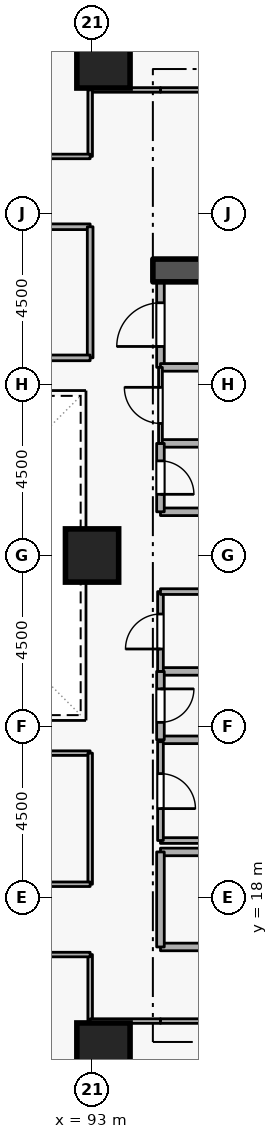
"""IFC4 building model, lengths in metres.
Left out: names, types, materials, properties, quantities, classifications, styles, units other than length and angle.
Written with IfcOpenShell. Run it as: python <this file> out.ifc"""

import sys

from ifc_helpers import new_model, si_unit, direction, frame, frame_2d, origin, origin_2d, place, context, subcontext, project, spatial, rectangle, extrude, element, fill, save


model = new_model("IFC4")
c1 = context("Model", 3, precision=1e-05, world=origin(), true_north=direction((0.0, 1.0)))
c2 = subcontext(c1, "Body", "Model", "MODEL_VIEW")
j1 = project(units=[si_unit("LENGTHUNIT", "METRE"), si_unit("PLANEANGLEUNIT", "RADIAN")], contexts=[c1])
p1 = place(None, origin())
s1 = spatial("IfcSite", under=j1, at=p1, CompositionType="ELEMENT")
p2 = place(p1, origin())
s2 = spatial("IfcBuilding", under=s1, at=p2, CompositionType="ELEMENT")
p3 = place(p2, frame((0.0, 0.0, 60.9)))
s3 = spatial("IfcBuildingStorey", under=s2, at=p3, CompositionType="ELEMENT", Elevation=60.9)
p4 = place(p3, frame((94.6, 34.5, 0.0), z_axis=(0.0, 0.0, 1.0), x_axis=(1.0, 0.0, 0.0)))
e1 = element("IfcWall", 1, at=p4, inside=s3, PredefinedType="SHEAR", context=c2, shape_type="SweptSolid", body=[
    extrude(rectangle(XDim=5.7, YDim=0.6, at=frame_2d((2.85, 0.0))), origin(), (0.0, 0.0, 1.0), 3.6),
])
for number, where, z_axis, x_axis in (
    (2, (93.3, 14.0, 0.0), (0.0, 0.0, 1.0), (1.0, 0.0, 0.0)),
    (3, (93.3, 40.0, 0.0), (0.0, 0.0, 1.0), (1.0, 0.0, 0.0)),
    (4, (93.0, 27.0, 0.0), (0.0, 0.0, 1.0), (1.0, 0.0, 0.0)),
):
    element("IfcColumn", number, at=place(p3, frame(where, z_axis=z_axis, x_axis=x_axis)), inside=s3, PredefinedType="COLUMN", context=c2, shape_type="SweptSolid", body=[
        extrude(rectangle(XDim=1.4, YDim=1.4, at=origin_2d()), origin(), (0.0, 0.0, 1.0), 3.6),
    ])
p5 = place(p3, frame((94.8, 16.7, 0.0), z_axis=(0.0, 0.0, 1.0), x_axis=(1.0, 0.0, 0.0)))
e5 = element("IfcWall", 5, at=p5, inside=s3, PredefinedType="STANDARD", context=c2, shape_type="SweptSolid", body=[
    extrude(rectangle(XDim=5.7, YDim=0.2, at=frame_2d((2.85, 0.0))), origin(), (0.0, 0.0, 1.0), 3.34),
])
p6 = place(p5, frame((2.275, 0.0, 0.0)))
e6 = element("IfcOpeningElement", 6, at=p6, cuts=e5, PredefinedType="OPENING", context=c2, shape_type="SweptSolid", body=[
    extrude(rectangle(XDim=1.15, YDim=2.1, at=frame_2d((0.575, 1.05))), frame((0.0, 0.11, 0.0), z_axis=(0.0, -1.0, 0.0), x_axis=(1.0, 0.0, 0.0)), (0.0, 0.0, 1.0), 0.22),
])
p7 = place(p3, frame((97.1, 19.2, 0.0), z_axis=(0.0, 0.0, 1.0), x_axis=(-1.0, 0.0, 0.0)))
e7 = element("IfcWall", 7, at=p7, inside=s3, PredefinedType="STANDARD", context=c2, shape_type="SweptSolid", body=[
    extrude(rectangle(XDim=2.3, YDim=0.2, at=frame_2d((1.15, 0.0))), origin(), (0.0, 0.0, 1.0), 2.545),
])
p8 = place(p3, frame((94.8, 19.2, 0.0), z_axis=(0.0, 0.0, 1.0), x_axis=(0.0, -1.0, 0.0)))
e8 = element("IfcWall", 8, at=p8, inside=s3, PredefinedType="STANDARD", context=c2, shape_type="SweptSolid", body=[
    extrude(rectangle(XDim=2.5, YDim=0.2, at=frame_2d((1.25, 0.0))), origin(), (0.0, 0.0, 1.0), 3.34),
])
for number, where, z_axis, x_axis in (
    (9, (94.8, 28.15, 0.0), (0.0, 0.0, 1.0), (1.0, 0.0, 0.0)),
    (10, (96.85, 29.95, 0.0), (0.0, 0.0, 1.0), (-1.0, 0.0, 0.0)),
):
    element("IfcWall", number, at=place(p3, frame(where, z_axis=z_axis, x_axis=x_axis)), inside=s3, PredefinedType="STANDARD", context=c2, shape_type="SweptSolid", body=[
        extrude(rectangle(XDim=2.05, YDim=0.2, at=frame_2d((1.025, 0.0))), origin(), (0.0, 0.0, 1.0), 3.34),
    ])
p9 = place(p3, frame((94.8, 29.95, 0.0), z_axis=(0.0, 0.0, 1.0), x_axis=(0.0, -1.0, 0.0)))
e11 = element("IfcWall", 11, at=p9, inside=s3, PredefinedType="STANDARD", context=c2, shape_type="SweptSolid", body=[
    extrude(rectangle(XDim=1.8, YDim=0.2, at=frame_2d((0.9, 0.0))), origin(), (0.0, 0.0, 1.0), 3.34),
])
p10 = place(p9, frame((0.46, 0.0, 0.0)))
e12 = element("IfcOpeningElement", 12, at=p10, cuts=e11, PredefinedType="OPENING", context=c2, shape_type="SweptSolid", body=[
    extrude(rectangle(XDim=0.88, YDim=2.04, at=frame_2d((0.44, 1.02))), frame((0.0, 0.11, 0.0), z_axis=(0.0, -1.0, 0.0), x_axis=(1.0, 0.0, 0.0)), (0.0, 0.0, 1.0), 0.22),
])
for number, where, z_axis, x_axis in (
    (13, (94.8, 22.15, 0.0), (0.0, 0.0, 1.0), (1.0, 0.0, 0.0)),
    (14, (96.85, 23.95, 0.0), (0.0, 0.0, 1.0), (-1.0, 0.0, 0.0)),
):
    element("IfcWall", number, at=place(p3, frame(where, z_axis=z_axis, x_axis=x_axis)), inside=s3, PredefinedType="STANDARD", context=c2, shape_type="SweptSolid", body=[
        extrude(rectangle(XDim=2.05, YDim=0.2, at=frame_2d((1.025, 0.0))), origin(), (0.0, 0.0, 1.0), 3.34),
    ])
p11 = place(p3, frame((94.8, 23.95, 0.0), z_axis=(0.0, 0.0, 1.0), x_axis=(0.0, -1.0, 0.0)))
e15 = element("IfcWall", 15, at=p11, inside=s3, PredefinedType="STANDARD", context=c2, shape_type="SweptSolid", body=[
    extrude(rectangle(XDim=1.8, YDim=0.2, at=frame_2d((0.9, 0.0))), origin(), (0.0, 0.0, 1.0), 3.34),
])
p12 = place(p11, frame((0.46, 0.0, 0.0)))
e16 = element("IfcOpeningElement", 16, at=p12, cuts=e15, PredefinedType="OPENING", context=c2, shape_type="SweptSolid", body=[
    extrude(rectangle(XDim=0.88, YDim=2.04, at=frame_2d((0.44, 1.02))), frame((0.0, 0.11, 0.0), z_axis=(0.0, -1.0, 0.0), x_axis=(1.0, 0.0, 0.0)), (0.0, 0.0, 1.0), 0.22),
])
p13 = place(p3, frame((94.8, 31.95, 0.0), z_axis=(0.0, 0.0, 1.0), x_axis=(0.0, 1.0, 0.0)))
e17 = element("IfcWall", 17, at=p13, inside=s3, PredefinedType="STANDARD", context=c2, shape_type="SweptSolid", body=[
    extrude(rectangle(XDim=2.25, YDim=0.2, at=frame_2d((1.125, 0.0))), origin(), (0.0, 0.0, 1.0), 3.34),
])
p14 = place(p13, frame((0.55, 0.0, 0.0)))
e18 = element("IfcOpeningElement", 18, at=p14, cuts=e17, PredefinedType="OPENING", context=c2, shape_type="SweptSolid", body=[
    extrude(rectangle(XDim=1.15, YDim=2.1, at=frame_2d((0.575, 1.05))), frame((0.0, 0.11, 0.0), z_axis=(0.0, -1.0, 0.0), x_axis=(1.0, 0.0, 0.0)), (0.0, 0.0, 1.0), 0.22),
])
p15 = place(p3, frame((96.85, 31.95, 0.0), z_axis=(0.0, 0.0, 1.0), x_axis=(-1.0, 0.0, 0.0)))
e19 = element("IfcWall", 19, at=p15, inside=s3, PredefinedType="STANDARD", context=c2, shape_type="SweptSolid", body=[
    extrude(rectangle(XDim=2.05, YDim=0.2, at=frame_2d((1.025, 0.0))), origin(), (0.0, 0.0, 1.0), 3.34),
])
p16 = place(p3, frame((94.8, 19.5, 0.0), z_axis=(0.0, 0.0, 1.0), x_axis=(1.0, 0.0, 0.0)))
e20 = element("IfcWall", 20, at=p16, inside=s3, PredefinedType="PARTITIONING", context=c2, shape_type="SweptSolid", body=[
    extrude(rectangle(XDim=2.05, YDim=0.15, at=frame_2d((1.025, 0.0))), origin(), (0.0, 0.0, 1.0), 2.545),
])
p17 = place(p3, frame((94.8, 22.1, 0.0), z_axis=(0.0, 0.0, 1.0), x_axis=(0.0, -1.0, 0.0)))
e21 = element("IfcWall", 21, at=p17, inside=s3, PredefinedType="PARTITIONING", context=c2, shape_type="SweptSolid", body=[
    extrude(rectangle(XDim=2.6, YDim=0.15, at=frame_2d((1.3, 0.0))), origin(), (0.0, 0.0, 1.0), 3.34),
])
p18 = place(p17, frame((0.84, 0.0, 0.0)))
e22 = element("IfcOpeningElement", 22, at=p18, cuts=e21, PredefinedType="OPENING", context=c2, shape_type="SweptSolid", body=[
    extrude(rectangle(XDim=0.92, YDim=2.08, at=frame_2d((0.46, 1.04))), frame((0.0, 0.085, 0.0), z_axis=(0.0, -1.0, 0.0), x_axis=(1.0, 0.0, 0.0)), (0.0, 0.0, 1.0), 0.17),
])
p19 = place(p3, frame((94.8, 23.95, 0.0), z_axis=(0.0, 0.0, 1.0), x_axis=(0.0, 1.0, 0.0)))
e23 = element("IfcWall", 23, at=p19, inside=s3, PredefinedType="PARTITIONING", context=c2, shape_type="SweptSolid", body=[
    extrude(rectangle(XDim=2.1, YDim=0.15, at=frame_2d((1.05, 0.0))), origin(), (0.0, 0.0, 1.0), 3.34),
])
p20 = place(p19, frame((0.59, 0.0, 0.0)))
e24 = element("IfcOpeningElement", 24, at=p20, cuts=e23, PredefinedType="OPENING", context=c2, shape_type="SweptSolid", body=[
    extrude(rectangle(XDim=0.92, YDim=2.08, at=frame_2d((0.46, 1.04))), frame((0.0, 0.085, 0.0), z_axis=(0.0, -1.0, 0.0), x_axis=(1.0, 0.0, 0.0)), (0.0, 0.0, 1.0), 0.17),
])
p21 = place(p3, frame((94.8, 26.05, 0.0), z_axis=(0.0, 0.0, 1.0), x_axis=(1.0, 0.0, 0.0)))
e25 = element("IfcWall", 25, at=p21, inside=s3, PredefinedType="PARTITIONING", context=c2, shape_type="SweptSolid", body=[
    extrude(rectangle(XDim=2.05, YDim=0.15, at=frame_2d((1.025, 0.0))), origin(), (0.0, 0.0, 1.0), 3.34),
])
p22 = place(p3, frame((94.8, 29.95, 0.0), z_axis=(0.0, 0.0, 1.0), x_axis=(0.0, 1.0, 0.0)))
e26 = element("IfcWall", 26, at=p22, inside=s3, PredefinedType="PARTITIONING", context=c2, shape_type="SweptSolid", body=[
    extrude(rectangle(XDim=2.0, YDim=0.1, at=frame_2d((1.0, 0.0))), origin(), (0.0, 0.0, 1.0), 3.34),
])
p23 = place(p22, frame((0.525, 0.0, 0.0)))
e27 = element("IfcOpeningElement", 27, at=p23, cuts=e26, PredefinedType="OPENING", context=c2, shape_type="SweptSolid", body=[
    extrude(rectangle(XDim=0.95, YDim=2.1, at=frame_2d((0.475, 1.05))), frame((0.0, 0.06, 0.0), z_axis=(0.0, -1.0, 0.0), x_axis=(1.0, 0.0, 0.0)), (0.0, 0.0, 1.0), 0.12),
])
p24 = place(p3, frame((92.95, 16.5, 0.0), z_axis=(0.0, 0.0, 1.0), x_axis=(0.0, -1.0, 0.0)))
e28 = element("IfcWall", 28, at=p24, inside=s3, PredefinedType="PARTITIONING", context=c2, shape_type="SweptSolid", body=[
    extrude(rectangle(XDim=1.75, YDim=0.12, at=frame_2d((0.875, 0.0))), origin(), (0.0, 0.0, 1.0), 3.34),
])
p25 = place(p3, frame((92.95, 14.75, 0.0), z_axis=(0.0, 0.0, 1.0), x_axis=(1.0, 0.0, 0.0)))
e29 = element("IfcWall", 29, at=p25, inside=s3, PredefinedType="PARTITIONING", context=c2, shape_type="SweptSolid", body=[
    extrude(rectangle(XDim=1.85, YDim=0.12, at=frame_2d((0.925, 0.0))), origin(), (0.0, 0.0, 1.0), 3.34),
])
p26 = place(p3, frame((94.8, 14.75, 0.0), z_axis=(0.0, 0.0, 1.0), x_axis=(1.0, 0.0, 0.0)))
e30 = element("IfcWall", 30, at=p26, inside=s3, PredefinedType="PARTITIONING", context=c2, shape_type="SweptSolid", body=[
    extrude(rectangle(XDim=9.35, YDim=0.12, at=frame_2d((4.675, 0.0))), origin(), (0.0, 0.0, 1.0), 3.34),
])
p27 = place(p26, frame((4.15, 0.0, 0.0)))
e31 = element("IfcOpeningElement", 31, at=p27, cuts=e30, PredefinedType="OPENING", context=c2, shape_type="SweptSolid", body=[
    extrude(rectangle(XDim=1.05, YDim=2.1, at=frame_2d((0.525, 1.05))), frame((0.0, 0.07, 0.0), z_axis=(0.0, -1.0, 0.0), x_axis=(1.0, 0.0, 0.0)), (0.0, 0.0, 1.0), 0.14),
])
p28 = place(p3, frame((88.5, 16.5, 0.0), z_axis=(0.0, 0.0, 1.0), x_axis=(1.0, 0.0, 0.0)))
e32 = element("IfcWall", 32, at=p28, inside=s3, PredefinedType="PARTITIONING", context=c2, shape_type="SweptSolid", body=[
    extrude(rectangle(XDim=4.45, YDim=0.12, at=frame_2d((2.225, 0.0))), origin(), (0.0, 0.0, 1.0), 3.34),
])
p29 = place(p3, frame((97.95, 39.25, 0.0), z_axis=(0.0, 0.0, 1.0), x_axis=(-1.0, 0.0, 0.0)))
e33 = element("IfcWall", 33, at=p29, inside=s3, PredefinedType="PARTITIONING", context=c2, shape_type="SweptSolid", body=[
    extrude(rectangle(XDim=3.15, YDim=0.12, at=frame_2d((1.575, 0.0))), origin(), (0.0, 0.0, 1.0), 3.34),
])
p30 = place(p3, frame((94.8, 39.25, 0.0), z_axis=(0.0, 0.0, 1.0), x_axis=(-1.0, 0.0, 0.0)))
e34 = element("IfcWall", 34, at=p30, inside=s3, PredefinedType="PARTITIONING", context=c2, shape_type="SweptSolid", body=[
    extrude(rectangle(XDim=1.85, YDim=0.12, at=frame_2d((0.925, 0.0))), origin(), (0.0, 0.0, 1.0), 3.34),
])
p31 = place(p3, frame((92.95, 39.25, 0.0), z_axis=(0.0, 0.0, 1.0), x_axis=(0.0, -1.0, 0.0)))
e35 = element("IfcWall", 35, at=p31, inside=s3, PredefinedType="PARTITIONING", context=c2, shape_type="SweptSolid", body=[
    extrude(rectangle(XDim=1.75, YDim=0.12, at=frame_2d((0.875, 0.0))), origin(), (0.0, 0.0, 1.0), 3.34),
])
p32 = place(p3, frame((92.95, 37.5, 0.0), z_axis=(0.0, 0.0, 1.0), x_axis=(-1.0, 0.0, 0.0)))
e36 = element("IfcWall", 36, at=p32, inside=s3, PredefinedType="PARTITIONING", context=c2, shape_type="SweptSolid", body=[
    extrude(rectangle(XDim=4.45, YDim=0.12, at=frame_2d((2.225, 0.0))), origin(), (0.0, 0.0, 1.0), 3.34),
])
p33 = place(p32, frame((1.7, 0.0, 0.0)))
e37 = element("IfcOpeningElement", 37, at=p33, cuts=e36, PredefinedType="OPENING", context=c2, shape_type="SweptSolid", body=[
    extrude(rectangle(XDim=1.05, YDim=2.1, at=frame_2d((0.525, 1.05))), frame((0.0, 0.07, 0.0), z_axis=(0.0, -1.0, 0.0), x_axis=(1.0, 0.0, 0.0)), (0.0, 0.0, 1.0), 0.14),
])
p34 = place(p3, frame((84.05, 35.65, 0.0), z_axis=(0.0, 0.0, 1.0), x_axis=(1.0, 0.0, 0.0)))
e38 = element("IfcWall", 38, at=p34, inside=s3, PredefinedType="PARTITIONING", context=c2, shape_type="SweptSolid", body=[
    extrude(rectangle(XDim=8.9, YDim=0.15, at=frame_2d((4.45, 0.0))), origin(), (0.0, 0.0, 1.0), 3.34),
])
p35 = place(p34, frame((3.8, 0.0, 0.0)))
e39 = element("IfcOpeningElement", 39, at=p35, cuts=e38, PredefinedType="OPENING", context=c2, shape_type="SweptSolid", body=[
    extrude(rectangle(XDim=1.3, YDim=2.12, at=frame_2d((0.65, 1.06))), frame((0.0, 0.085, 0.0), z_axis=(0.0, -1.0, 0.0), x_axis=(1.0, 0.0, 0.0)), (0.0, 0.0, 1.0), 0.17),
])
p36 = place(p3, frame((92.95, 35.65, 0.0), z_axis=(0.0, 0.0, 1.0), x_axis=(0.0, -1.0, 0.0)))
e40 = element("IfcWall", 40, at=p36, inside=s3, PredefinedType="PARTITIONING", context=c2, shape_type="SweptSolid", body=[
    extrude(rectangle(XDim=3.45, YDim=0.15, at=frame_2d((1.725, 0.0))), origin(), (0.0, 0.0, 1.0), 3.34),
])
p37 = place(p3, frame((92.95, 32.2, 0.0), z_axis=(0.0, 0.0, 1.0), x_axis=(-1.0, 0.0, 0.0)))
e41 = element("IfcWall", 41, at=p37, inside=s3, PredefinedType="PARTITIONING", context=c2, shape_type="SweptSolid", body=[
    extrude(rectangle(XDim=8.9, YDim=0.15, at=frame_2d((4.45, 0.0))), origin(), (0.0, 0.0, 1.0), 3.34),
])
p38 = place(p3, frame((84.05, 21.8, 0.0), z_axis=(0.0, 0.0, 1.0), x_axis=(1.0, 0.0, 0.0)))
e42 = element("IfcWall", 42, at=p38, inside=s3, PredefinedType="PARTITIONING", context=c2, shape_type="SweptSolid", body=[
    extrude(rectangle(XDim=8.9, YDim=0.12, at=frame_2d((4.45, 0.0))), origin(), (0.0, 0.0, 1.0), 3.34),
])
p39 = place(p3, frame((92.95, 21.8, 0.0), z_axis=(0.0, 0.0, 1.0), x_axis=(0.0, -1.0, 0.0)))
e43 = element("IfcWall", 43, at=p39, inside=s3, PredefinedType="PARTITIONING", context=c2, shape_type="SweptSolid", body=[
    extrude(rectangle(XDim=3.45, YDim=0.12, at=frame_2d((1.725, 0.0))), origin(), (0.0, 0.0, 1.0), 3.34),
])
p40 = place(p3, frame((92.95, 18.35, 0.0), z_axis=(0.0, 0.0, 1.0), x_axis=(-1.0, 0.0, 0.0)))
e44 = element("IfcWall", 44, at=p40, inside=s3, PredefinedType="PARTITIONING", context=c2, shape_type="SweptSolid", body=[
    extrude(rectangle(XDim=8.9, YDim=0.12, at=frame_2d((4.45, 0.0))), origin(), (0.0, 0.0, 1.0), 3.34),
])
p41 = place(p40, frame((3.975, 0.0, 0.0)))
e45 = element("IfcOpeningElement", 45, at=p41, cuts=e44, PredefinedType="OPENING", context=c2, shape_type="SweptSolid", body=[
    extrude(rectangle(XDim=0.95, YDim=2.1, at=frame_2d((0.475, 1.05))), frame((0.0, 0.07, 0.0), z_axis=(0.0, -1.0, 0.0), x_axis=(1.0, 0.0, 0.0)), (0.0, 0.0, 1.0), 0.14),
])
p42 = place(p10, origin())
e46 = element("IfcDoor", 46, at=p42, inside=s3, OperationType="SINGLE_SWING_RIGHT", PredefinedType="DOOR", context=c2, shape_type="SweptSolid", body=[
    extrude(rectangle(XDim=0.88, YDim=2.04, at=frame_2d((0.44, 1.02))), frame((0.0, 0.025, 0.0), z_axis=(0.0, -1.0, 0.0), x_axis=(1.0, 0.0, 0.0)), (0.0, 0.0, 1.0), 0.05),
])
fill(e12, e46)
p43 = place(p12, origin())
e47 = element("IfcDoor", 47, at=p43, inside=s3, OperationType="SINGLE_SWING_LEFT", PredefinedType="DOOR", context=c2, shape_type="SweptSolid", body=[
    extrude(rectangle(XDim=0.88, YDim=2.04, at=frame_2d((0.44, 1.02))), frame((0.0, 0.025, 0.0), z_axis=(0.0, -1.0, 0.0), x_axis=(1.0, 0.0, 0.0)), (0.0, 0.0, 1.0), 0.05),
])
fill(e16, e47)
p44 = place(p18, origin())
e48 = element("IfcDoor", 48, at=p44, inside=s3, OperationType="SINGLE_SWING_RIGHT", PredefinedType="DOOR", context=c2, shape_type="SweptSolid", body=[
    extrude(rectangle(XDim=0.92, YDim=2.08, at=frame_2d((0.46, 1.04))), frame((0.0, 0.025, 0.0), z_axis=(0.0, -1.0, 0.0), x_axis=(1.0, 0.0, 0.0)), (0.0, 0.0, 1.0), 0.05),
])
fill(e22, e48)
p45 = place(p20, origin())
e49 = element("IfcDoor", 49, at=p45, inside=s3, OperationType="SINGLE_SWING_LEFT", PredefinedType="DOOR", context=c2, shape_type="SweptSolid", body=[
    extrude(rectangle(XDim=0.92, YDim=2.08, at=frame_2d((0.46, 1.04))), frame((0.0, 0.025, 0.0), z_axis=(0.0, -1.0, 0.0), x_axis=(1.0, 0.0, 0.0)), (0.0, 0.0, 1.0), 0.05),
])
fill(e24, e49)
p46 = place(p23, origin())
e50 = element("IfcDoor", 50, at=p46, inside=s3, OperationType="SINGLE_SWING_RIGHT", PredefinedType="DOOR", context=c2, shape_type="SweptSolid", body=[
    extrude(rectangle(XDim=0.95, YDim=2.1, at=frame_2d((0.475, 1.05))), frame((0.0, 0.025, 0.0), z_axis=(0.0, -1.0, 0.0), x_axis=(1.0, 0.0, 0.0)), (0.0, 0.0, 1.0), 0.05),
])
fill(e27, e50)
p47 = place(p14, origin())
e51 = element("IfcDoor", 51, at=p47, inside=s3, OperationType="SINGLE_SWING_LEFT", PredefinedType="DOOR", context=c2, shape_type="SweptSolid", body=[
    extrude(rectangle(XDim=1.15, YDim=2.1, at=frame_2d((0.575, 1.05))), frame((0.0, 0.025, 0.0), z_axis=(0.0, -1.0, 0.0), x_axis=(1.0, 0.0, 0.0)), (0.0, 0.0, 1.0), 0.05),
])
fill(e18, e51)
save(model, sys.argv[1])
